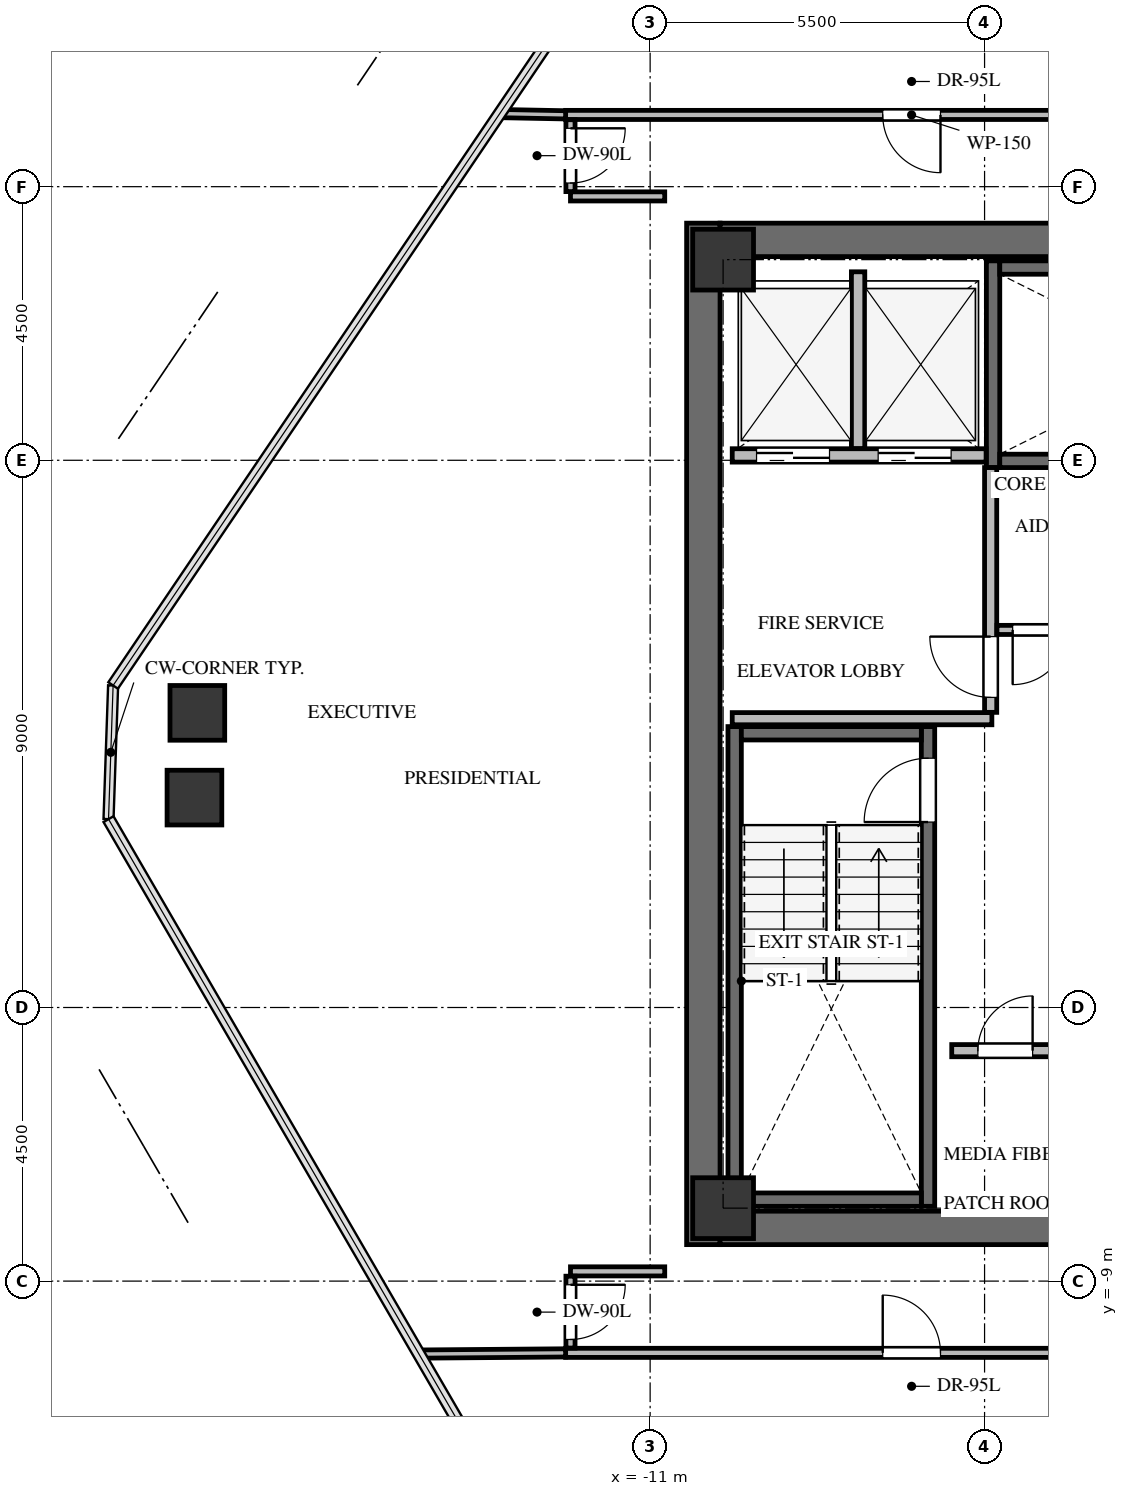
"""IFC4 building model, lengths in metres.
Left out: names, types, materials, properties, quantities, classifications, styles, units other than length and angle.
Written with IfcOpenShell. Run it as: python <this file> out.ifc"""

import sys

from ifc_helpers import new_model, si_unit, direction, frame, frame_2d, origin, origin_2d, place, context, subcontext, project, spatial, rectangle, extrude, source, transform, mapped, element, fill, save


model = new_model("IFC4")
c1 = context("Model", 3, precision=1e-05, world=origin(), true_north=direction((0.0, 1.0)))
c2 = subcontext(c1, "Body", "Model", "MODEL_VIEW")
j1 = project(units=[si_unit("LENGTHUNIT", "METRE"), si_unit("PLANEANGLEUNIT", "RADIAN")], contexts=[c1])
p1 = place(None, origin())
s1 = spatial("IfcSite", under=j1, at=p1, CompositionType="ELEMENT")
p2 = place(p1, origin())
s2 = spatial("IfcBuilding", under=s1, at=p2, CompositionType="ELEMENT")
p3 = place(p2, frame((0.0, 0.0, 221.6)))
s3 = spatial("IfcBuildingStorey", under=s2, at=p3, CompositionType="ELEMENT", Elevation=221.6)
p4 = place(p3, frame((-10.125, -8.4, 0.0), z_axis=(0.0, 0.0, 1.0), x_axis=(0.0, 1.0, 0.0)))
e1 = element("IfcWall", 1, at=p4, inside=s3, PredefinedType="SHEAR", context=c2, shape_type="SweptSolid", body=[
    extrude(rectangle(XDim=16.8, YDim=0.55, at=frame_2d((8.4, 0.0))), origin(), (0.0, 0.0, 1.0), 3.3),
])
p5 = place(p3, frame((-9.85, -8.125, 0.0), z_axis=(0.0, 0.0, 1.0), x_axis=(1.0, 0.0, 0.0)))
e2 = element("IfcWall", 2, at=p5, inside=s3, PredefinedType="SHEAR", context=c2, shape_type="SweptSolid", body=[
    extrude(rectangle(XDim=7.75, YDim=0.55, at=frame_2d((3.875, 0.0))), origin(), (0.0, 0.0, 1.0), 3.3),
])
p6 = place(p3, frame((-9.85, 8.125, 0.0), z_axis=(0.0, 0.0, 1.0), x_axis=(1.0, 0.0, 0.0)))
e3 = element("IfcWall", 3, at=p6, inside=s3, PredefinedType="SHEAR", context=c2, shape_type="SweptSolid", body=[
    extrude(rectangle(XDim=19.7, YDim=0.55, at=frame_2d((9.85, 0.0))), origin(), (0.0, 0.0, 1.0), 3.3),
])
p7 = place(p3, frame((-6.43, -7.77, -0.24), z_axis=(0.0, 0.0, 1.0), x_axis=(0.0, 1.0, 0.0)))
e4 = element("IfcWall", 4, at=p7, inside=s3, PredefinedType="SHEAR", context=c2, shape_type="SweptSolid", body=[
    extrude(rectangle(XDim=7.89, YDim=0.22, at=frame_2d((3.945, 0.0))), origin(), (0.0, 0.0, 1.0), 3.3),
])
p8 = place(p7, frame((6.32, 0.0, 0.0)))
e5 = element("IfcOpeningElement", 5, at=p8, cuts=e4, PredefinedType="OPENING", context=c2, shape_type="SweptSolid", body=[
    extrude(rectangle(XDim=1.05, YDim=2.15, at=frame_2d((0.525, 1.075))), frame((0.0, 0.12, 0.0), z_axis=(0.0, -1.0, 0.0), x_axis=(1.0, 0.0, 0.0)), (0.0, 0.0, 1.0), 0.24),
])
p9 = place(p3, frame((-9.61, 0.12, -0.24), z_axis=(0.0, 0.0, 1.0), x_axis=(0.0, -1.0, 0.0)))
e6 = element("IfcWall", 6, at=p9, inside=s3, PredefinedType="SHEAR", context=c2, shape_type="SweptSolid", body=[
    extrude(rectangle(XDim=7.89, YDim=0.22, at=frame_2d((3.945, 0.0))), origin(), (0.0, 0.0, 1.0), 3.3),
])
for number, where, z_axis, x_axis in (
    (7, (-9.5, -7.66, -0.24), (0.0, 0.0, 1.0), (1.0, 0.0, 0.0)),
    (8, (-6.54, 0.01, -0.24), (0.0, 0.0, 1.0), (-1.0, 0.0, 0.0)),
):
    element("IfcWall", number, at=place(p3, frame(where, z_axis=z_axis, x_axis=x_axis)), inside=s3, PredefinedType="SHEAR", context=c2, shape_type="SweptSolid", body=[
        extrude(rectangle(XDim=2.96, YDim=0.22, at=frame_2d((1.48, 0.0))), origin(), (0.0, 0.0, 1.0), 3.3),
    ])
p10 = place(p3, frame((-5.36, 7.78, -0.24), z_axis=(0.0, 0.0, 1.0), x_axis=(0.0, -1.0, 0.0)))
e9 = element("IfcWall", 9, at=p10, inside=s3, PredefinedType="SHEAR", context=c2, shape_type="SweptSolid", body=[
    extrude(rectangle(XDim=3.4, YDim=0.22, at=frame_2d((1.7, 0.0))), origin(), (0.0, 0.0, 1.0), 3.3),
])
p11 = place(p3, frame((-5.25, 4.49, -0.24), z_axis=(0.0, 0.0, 1.0), x_axis=(1.0, 0.0, 0.0)))
e10 = element("IfcWall", 10, at=p11, inside=s3, PredefinedType="SHEAR", context=c2, shape_type="SweptSolid", body=[
    extrude(rectangle(XDim=7.35, YDim=0.22, at=frame_2d((3.675, 0.0))), origin(), (0.0, 0.0, 1.0), 3.3),
])
p12 = place(p11, frame((5.85, 0.0, 0.0)))
e11 = element("IfcOpeningElement", 11, at=p12, cuts=e10, PredefinedType="OPENING", context=c2, shape_type="SweptSolid", body=[
    extrude(rectangle(XDim=1.05, YDim=2.15, at=frame_2d((0.525, 1.075))), frame((0.0, 0.12, 0.0), z_axis=(0.0, -1.0, 0.0), x_axis=(1.0, 0.0, 0.0)), (0.0, 0.0, 1.0), 0.24),
])
p13 = place(p3, frame((2.1, 7.67, -0.24), z_axis=(0.0, 0.0, 1.0), x_axis=(-1.0, 0.0, 0.0)))
e12 = element("IfcWall", 12, at=p13, inside=s3, PredefinedType="SHEAR", context=c2, shape_type="SweptSolid", body=[
    extrude(rectangle(XDim=7.35, YDim=0.22, at=frame_2d((3.675, 0.0))), origin(), (0.0, 0.0, 1.0), 3.3),
])
m1 = source(origin(), c2, "Body", "SweptSolid", [
    extrude(rectangle(XDim=1.0, YDim=1.0, at=origin_2d()), origin(), (0.0, 0.0, 1.0), 3.3),
])
for number, where, z_axis, x_axis in (
    (13, (-9.8, -7.8, -0.24), (0.0, 0.0, 1.0), (1.0, 0.0, 0.0)),
    (14, (-9.8, 7.8, -0.24), (0.0, 0.0, 1.0), (1.0, 0.0, 0.0)),
):
    element("IfcColumn", number, at=place(p3, frame(where, z_axis=z_axis, x_axis=x_axis)), inside=s3, PredefinedType="COLUMN", context=c2, shape_type="MappedRepresentation", body=[
        mapped(m1, transform((0.0, 0.0, 0.0), x_axis=(1.0, 0.0, 0.0), y_axis=(0.0, 1.0, 0.0), z_axis=(0.0, 0.0, 1.0), scale=1.0)),
    ])
m2 = source(origin(), c2, "Body", "SweptSolid", [
    extrude(rectangle(XDim=0.9, YDim=0.9, at=origin_2d()), origin(), (0.0, 0.0, 1.0), 3.3),
])
for number, where, z_axis, x_axis in (
    (15, (-18.494, -1.048, -0.24), (0.0, 0.0, 1.0), (1.0, 0.0, 0.0)),
    (16, (-18.446, 0.346, -0.24), (0.0, 0.0, 1.0), (1.0, 0.0, 0.0)),
):
    element("IfcColumn", number, at=place(p3, frame(where, z_axis=z_axis, x_axis=x_axis)), inside=s3, PredefinedType="COLUMN", context=c2, shape_type="MappedRepresentation", body=[
        mapped(m2, transform((0.0, 0.0, 0.0), x_axis=(1.0, 0.0, 0.0), y_axis=(0.0, 1.0, 0.0), z_axis=(0.0, 0.0, 1.0), scale=1.0)),
    ])
p14 = place(p3, frame((-9.65, 4.58, 0.0), z_axis=(0.0, 0.0, 1.0), x_axis=(1.0, 0.0, 0.0)))
e17 = element("IfcWall", 17, at=p14, inside=s3, PredefinedType="SOLIDWALL", context=c2, shape_type="SweptSolid", body=[
    extrude(rectangle(XDim=4.175, YDim=0.22, at=frame_2d((2.087, 0.0))), origin(), (0.0, 0.0, 1.0), 3.045),
])
p15 = place(p14, frame((0.4, 0.0, 0.0)))
e18 = element("IfcOpeningElement", 18, at=p15, cuts=e17, PredefinedType="OPENING", context=c2, shape_type="SweptSolid", body=[
    extrude(rectangle(XDim=1.2, YDim=2.15, at=frame_2d((0.6, 1.075))), frame((0.0, 0.12, 0.0), z_axis=(0.0, -1.0, 0.0), x_axis=(1.0, 0.0, 0.0)), (0.0, 0.0, 1.0), 0.24),
])
p16 = place(p14, frame((2.4, 0.0, 0.0)))
e19 = element("IfcOpeningElement", 19, at=p16, cuts=e17, PredefinedType="OPENING", context=c2, shape_type="SweptSolid", body=[
    extrude(rectangle(XDim=1.2, YDim=2.15, at=frame_2d((0.6, 1.075))), frame((0.0, 0.12, 0.0), z_axis=(0.0, -1.0, 0.0), x_axis=(1.0, 0.0, 0.0)), (0.0, 0.0, 1.0), 0.24),
])
p17 = place(p3, frame((-7.58, 4.694, 0.0), z_axis=(0.0, 0.0, 1.0), x_axis=(0.0, 1.0, 0.0)))
e20 = element("IfcWall", 20, at=p17, inside=s3, PredefinedType="SOLIDWALL", context=c2, shape_type="SweptSolid", body=[
    extrude(rectangle(XDim=2.906, YDim=0.22, at=frame_2d((1.453, 0.0))), origin(), (0.0, 0.0, 1.0), 3.045),
])
p18 = place(p3, frame((-9.65, 0.25, 0.0), z_axis=(0.0, 0.0, 1.0), x_axis=(1.0, 0.0, 0.0)))
e21 = element("IfcWall", 21, at=p18, inside=s3, PredefinedType="SOLIDWALL", context=c2, shape_type="SweptSolid", body=[
    extrude(rectangle(XDim=4.27, YDim=0.2, at=frame_2d((2.135, 0.0))), origin(), (0.0, 0.0, 1.0), 3.045),
])
p19 = place(p3, frame((-5.4, 0.354, 0.0), z_axis=(0.0, 0.0, 1.0), x_axis=(0.0, 1.0, 0.0)))
e22 = element("IfcWall", 22, at=p19, inside=s3, PredefinedType="SOLIDWALL", context=c2, shape_type="SweptSolid", body=[
    extrude(rectangle(XDim=4.026, YDim=0.2, at=frame_2d((2.013, 0.0))), origin(), (0.0, 0.0, 1.0), 3.045),
])
p20 = place(p19, frame((0.246, 0.0, 0.0)))
e23 = element("IfcOpeningElement", 23, at=p20, cuts=e22, PredefinedType="OPENING", context=c2, shape_type="SweptSolid", body=[
    extrude(rectangle(XDim=1.0, YDim=2.15, at=frame_2d((0.5, 1.075))), frame((0.0, 0.11, 0.0), z_axis=(0.0, -1.0, 0.0), x_axis=(1.0, 0.0, 0.0)), (0.0, 0.0, 1.0), 0.22),
])
p21 = place(p3, frame((-6.04, -5.21, 0.0), z_axis=(0.0, 0.0, 1.0), x_axis=(1.0, 0.0, 0.0)))
e24 = element("IfcWall", 24, at=p21, inside=s3, PredefinedType="SOLIDWALL", context=c2, shape_type="SweptSolid", body=[
    extrude(rectangle(XDim=1.76, YDim=0.2, at=frame_2d((0.88, 0.0))), origin(), (0.0, 0.0, 1.0), 3.045),
])
p22 = place(p21, frame((0.43, 0.0, 0.0)))
e25 = element("IfcOpeningElement", 25, at=p22, cuts=e24, PredefinedType="OPENING", context=c2, shape_type="SweptSolid", body=[
    extrude(rectangle(XDim=0.9, YDim=2.05, at=frame_2d((0.45, 1.025))), frame((0.0, 0.11, 0.0), z_axis=(0.0, -1.0, 0.0), x_axis=(1.0, 0.0, 0.0)), (0.0, 0.0, 1.0), 0.22),
])
p23 = place(p3, frame((-3.88, 1.71, 0.0), z_axis=(0.0, 0.0, 1.0), x_axis=(-1.0, 0.0, 0.0)))
e26 = element("IfcWall", 26, at=p23, inside=s3, PredefinedType="PARTITIONING", context=c2, shape_type="SweptSolid", body=[
    extrude(rectangle(XDim=1.416, YDim=0.15, at=frame_2d((0.708, 0.0))), origin(), (0.0, 0.0, 1.0), 3.045),
])
p24 = place(p23, frame((0.258, 0.0, 0.0)))
e27 = element("IfcOpeningElement", 27, at=p24, cuts=e26, PredefinedType="OPENING", context=c2, shape_type="SweptSolid", body=[
    extrude(rectangle(XDim=0.9, YDim=2.05, at=frame_2d((0.45, 1.025))), frame((0.0, 0.085, 0.0), z_axis=(0.0, -1.0, 0.0), x_axis=(1.0, 0.0, 0.0)), (0.0, 0.0, 1.0), 0.17),
])
p25 = place(p3, frame((-1.01, 10.18, 0.0), z_axis=(0.0, 0.0, 1.0), x_axis=(-1.0, 0.0, 0.0)))
e28 = element("IfcWall", 28, at=p25, inside=s3, PredefinedType="PARTITIONING", context=c2, shape_type="SweptSolid", body=[
    extrude(rectangle(XDim=11.38, YDim=0.15, at=frame_2d((5.69, 0.0))), origin(), (0.0, 0.0, 1.0), 2.301),
])
p26 = place(p25, frame((5.215, 0.0, 0.0)))
e29 = element("IfcOpeningElement", 29, at=p26, cuts=e28, PredefinedType="OPENING", context=c2, shape_type="SweptSolid", body=[
    extrude(rectangle(XDim=0.95, YDim=2.1, at=frame_2d((0.475, 1.05))), frame((0.0, 0.085, 0.0), z_axis=(0.0, -1.0, 0.0), x_axis=(1.0, 0.0, 0.0)), (0.0, 0.0, 1.0), 0.17),
])
p27 = place(p3, frame((-12.39, -10.18, 0.0), z_axis=(0.0, 0.0, 1.0), x_axis=(1.0, 0.0, 0.0)))
e30 = element("IfcWall", 30, at=p27, inside=s3, PredefinedType="PARTITIONING", context=c2, shape_type="SweptSolid", body=[
    extrude(rectangle(XDim=11.38, YDim=0.15, at=frame_2d((5.69, 0.0))), origin(), (0.0, 0.0, 1.0), 2.301),
])
p28 = place(p27, frame((5.215, 0.0, 0.0)))
e31 = element("IfcOpeningElement", 31, at=p28, cuts=e30, PredefinedType="OPENING", context=c2, shape_type="SweptSolid", body=[
    extrude(rectangle(XDim=0.95, YDim=2.1, at=frame_2d((0.475, 1.05))), frame((0.0, 0.085, 0.0), z_axis=(0.0, -1.0, 0.0), x_axis=(1.0, 0.0, 0.0)), (0.0, 0.0, 1.0), 0.17),
])
p29 = place(p3, frame((-10.76, -8.84, 0.0), z_axis=(0.0, 0.0, 1.0), x_axis=(-1.0, 0.0, 0.0)))
e32 = element("IfcWall", 32, at=p29, inside=s3, PredefinedType="PARTITIONING", context=c2, shape_type="SweptSolid", body=[
    extrude(rectangle(XDim=1.55, YDim=0.15, at=frame_2d((0.775, 0.0))), origin(), (0.0, 0.0, 1.0), 3.045),
])
p30 = place(p3, frame((-12.31, -8.919, 0.0), z_axis=(0.0, 0.0, 1.0), x_axis=(0.0, -1.0, 0.0)))
e33 = element("IfcWall", 33, at=p30, inside=s3, PredefinedType="PARTITIONING", context=c2, shape_type="SweptSolid", body=[
    extrude(rectangle(XDim=1.182, YDim=0.15, at=frame_2d((0.591, 0.0))), origin(), (0.0, 0.0, 1.0), 3.045),
])
p31 = place(p30, frame((0.141, 0.0, 0.0)))
e34 = element("IfcOpeningElement", 34, at=p31, cuts=e33, PredefinedType="OPENING", context=c2, shape_type="SweptSolid", body=[
    extrude(rectangle(XDim=0.9, YDim=2.05, at=frame_2d((0.45, 1.025))), frame((0.0, 0.085, 0.0), z_axis=(0.0, -1.0, 0.0), x_axis=(1.0, 0.0, 0.0)), (0.0, 0.0, 1.0), 0.17),
])
p32 = place(p3, frame((-12.31, 8.84, 0.0), z_axis=(0.0, 0.0, 1.0), x_axis=(1.0, 0.0, 0.0)))
e35 = element("IfcWall", 35, at=p32, inside=s3, PredefinedType="PARTITIONING", context=c2, shape_type="SweptSolid", body=[
    extrude(rectangle(XDim=1.55, YDim=0.15, at=frame_2d((0.775, 0.0))), origin(), (0.0, 0.0, 1.0), 3.045),
])
p33 = place(p3, frame((-12.31, 10.101, 0.0), z_axis=(0.0, 0.0, 1.0), x_axis=(0.0, -1.0, 0.0)))
e36 = element("IfcWall", 36, at=p33, inside=s3, PredefinedType="PARTITIONING", context=c2, shape_type="SweptSolid", body=[
    extrude(rectangle(XDim=1.182, YDim=0.15, at=frame_2d((0.591, 0.0))), origin(), (0.0, 0.0, 1.0), 2.399),
])
p34 = place(p33, frame((0.141, 0.0, 0.0)))
e37 = element("IfcOpeningElement", 37, at=p34, cuts=e36, PredefinedType="OPENING", context=c2, shape_type="SweptSolid", body=[
    extrude(rectangle(XDim=0.9, YDim=2.05, at=frame_2d((0.45, 1.025))), frame((0.0, 0.085, 0.0), z_axis=(0.0, -1.0, 0.0), x_axis=(1.0, 0.0, 0.0)), (0.0, 0.0, 1.0), 0.17),
])
p35 = place(p3, frame((-12.39, 10.181, 0.0), z_axis=(0.0, 0.0, 1.0), x_axis=(-0.999812128272, 0.019383192748, 0.0)))
e38 = element("IfcWall", 38, at=p35, inside=s3, PredefinedType="PARTITIONING", context=c2, shape_type="SweptSolid", body=[
    extrude(rectangle(XDim=1.083, YDim=0.135, at=frame_2d((0.542, 0.0))), origin(), (0.0, 0.0, 1.0), 3.045),
])
p36 = place(p3, frame((-14.802, -10.2, 0.0), z_axis=(0.0, 0.0, 1.0), x_axis=(0.999968020968, 0.007997314604, 0.0)))
e39 = element("IfcWall", 39, at=p36, inside=s3, PredefinedType="PARTITIONING", context=c2, shape_type="SweptSolid", body=[
    extrude(rectangle(XDim=2.412, YDim=0.135, at=frame_2d((1.206, 0.0))), origin(), (0.0, 0.0, 1.0), 2.399),
])
m3 = source(origin(), c2, "Body", "SweptSolid", [
    extrude(rectangle(XDim=1.05, YDim=2.15, at=frame_2d((0.525, 1.075))), frame((0.0, 0.025, 0.0), z_axis=(0.0, -1.0, 0.0), x_axis=(1.0, 0.0, 0.0)), (0.0, 0.0, 1.0), 0.05),
])
p37 = place(p8, origin())
e40 = element("IfcDoor", 40, at=p37, inside=s3, OperationType="SINGLE_SWING_LEFT", PredefinedType="DOOR", context=c2, shape_type="MappedRepresentation", body=[
    mapped(m3, transform((0.0, 0.0, 0.0), x_axis=(1.0, 0.0, 0.0), y_axis=(0.0, 1.0, 0.0), z_axis=(0.0, 0.0, 1.0), scale=1.0)),
])
fill(e5, e40)
m4 = source(origin(), c2, "Body", "SweptSolid", [
    extrude(rectangle(XDim=1.2, YDim=2.15, at=frame_2d((0.6, 1.075))), frame((0.0, 0.025, 0.0), z_axis=(0.0, -1.0, 0.0), x_axis=(1.0, 0.0, 0.0)), (0.0, 0.0, 1.0), 0.05),
])
p38 = place(p15, origin())
e41 = element("IfcDoor", 41, at=p38, inside=s3, OperationType="DOUBLE_DOOR_SLIDING", PredefinedType="DOOR", context=c2, shape_type="MappedRepresentation", body=[
    mapped(m4, transform((0.0, 0.0, 0.0), x_axis=(1.0, 0.0, 0.0), y_axis=(0.0, 1.0, 0.0), z_axis=(0.0, 0.0, 1.0), scale=1.0)),
])
fill(e18, e41)
p39 = place(p16, origin())
e42 = element("IfcDoor", 42, at=p39, inside=s3, OperationType="DOUBLE_DOOR_SLIDING", PredefinedType="DOOR", context=c2, shape_type="MappedRepresentation", body=[
    mapped(m4, transform((0.0, 0.0, 0.0), x_axis=(1.0, 0.0, 0.0), y_axis=(0.0, 1.0, 0.0), z_axis=(0.0, 0.0, 1.0), scale=1.0)),
])
fill(e19, e42)
m5 = source(origin(), c2, "Body", "SweptSolid", [
    extrude(rectangle(XDim=1.0, YDim=2.15, at=frame_2d((0.5, 1.075))), frame((0.0, 0.025, 0.0), z_axis=(0.0, -1.0, 0.0), x_axis=(1.0, 0.0, 0.0)), (0.0, 0.0, 1.0), 0.05),
])
p40 = place(p20, origin())
e43 = element("IfcDoor", 43, at=p40, inside=s3, OperationType="SINGLE_SWING_RIGHT", PredefinedType="DOOR", context=c2, shape_type="MappedRepresentation", body=[
    mapped(m5, transform((0.0, 0.0, 0.0), x_axis=(1.0, 0.0, 0.0), y_axis=(0.0, 1.0, 0.0), z_axis=(0.0, 0.0, 1.0), scale=1.0)),
])
fill(e23, e43)
m6 = source(origin(), c2, "Body", "SweptSolid", [
    extrude(rectangle(XDim=0.9, YDim=2.05, at=frame_2d((0.45, 1.025))), frame((0.0, 0.025, 0.0), z_axis=(0.0, -1.0, 0.0), x_axis=(1.0, 0.0, 0.0)), (0.0, 0.0, 1.0), 0.05),
])
p41 = place(p22, origin())
e44 = element("IfcDoor", 44, at=p41, inside=s3, OperationType="SINGLE_SWING_RIGHT", PredefinedType="DOOR", context=c2, shape_type="MappedRepresentation", body=[
    mapped(m6, transform((0.0, 0.0, 0.0), x_axis=(1.0, 0.0, 0.0), y_axis=(0.0, 1.0, 0.0), z_axis=(0.0, 0.0, 1.0), scale=1.0)),
])
fill(e25, e44)
p42 = place(p24, origin())
e45 = element("IfcDoor", 45, at=p42, inside=s3, OperationType="SINGLE_SWING_RIGHT", PredefinedType="DOOR", context=c2, shape_type="MappedRepresentation", body=[
    mapped(m6, transform((0.0, 0.0, 0.0), x_axis=(1.0, 0.0, 0.0), y_axis=(0.0, 1.0, 0.0), z_axis=(0.0, 0.0, 1.0), scale=1.0)),
])
fill(e27, e45)
m7 = source(origin(), c2, "Body", "SweptSolid", [
    extrude(rectangle(XDim=0.95, YDim=2.1, at=frame_2d((0.475, 1.05))), frame((0.0, 0.025, 0.0), z_axis=(0.0, -1.0, 0.0), x_axis=(1.0, 0.0, 0.0)), (0.0, 0.0, 1.0), 0.05),
])
p43 = place(p26, origin())
e46 = element("IfcDoor", 46, at=p43, inside=s3, OperationType="SINGLE_SWING_LEFT", PredefinedType="DOOR", context=c2, shape_type="MappedRepresentation", body=[
    mapped(m7, transform((0.0, 0.0, 0.0), x_axis=(1.0, 0.0, 0.0), y_axis=(0.0, 1.0, 0.0), z_axis=(0.0, 0.0, 1.0), scale=1.0)),
])
fill(e29, e46)
p44 = place(p28, origin())
e47 = element("IfcDoor", 47, at=p44, inside=s3, OperationType="SINGLE_SWING_LEFT", PredefinedType="DOOR", context=c2, shape_type="MappedRepresentation", body=[
    mapped(m7, transform((0.0, 0.0, 0.0), x_axis=(1.0, 0.0, 0.0), y_axis=(0.0, 1.0, 0.0), z_axis=(0.0, 0.0, 1.0), scale=1.0)),
])
fill(e31, e47)
m8 = source(origin(), c2, "Body", "SweptSolid", [
    extrude(rectangle(XDim=0.9, YDim=2.05, at=frame_2d((0.45, 1.025))), frame((0.0, 0.025, 0.0), z_axis=(0.0, -1.0, 0.0), x_axis=(1.0, 0.0, 0.0)), (0.0, 0.0, 1.0), 0.05),
])
p45 = place(p31, origin())
e48 = element("IfcDoor", 48, at=p45, inside=s3, OperationType="SINGLE_SWING_LEFT", PredefinedType="DOOR", context=c2, shape_type="MappedRepresentation", body=[
    mapped(m8, transform((0.0, 0.0, 0.0), x_axis=(1.0, 0.0, 0.0), y_axis=(0.0, 1.0, 0.0), z_axis=(0.0, 0.0, 1.0), scale=1.0)),
])
fill(e34, e48)
p46 = place(p34, origin())
e49 = element("IfcDoor", 49, at=p46, inside=s3, OperationType="SINGLE_SWING_LEFT", PredefinedType="DOOR", context=c2, shape_type="MappedRepresentation", body=[
    mapped(m8, transform((0.0, 0.0, 0.0), x_axis=(1.0, 0.0, 0.0), y_axis=(0.0, 1.0, 0.0), z_axis=(0.0, 0.0, 1.0), scale=1.0)),
])
fill(e37, e49)
save(model, sys.argv[1])
